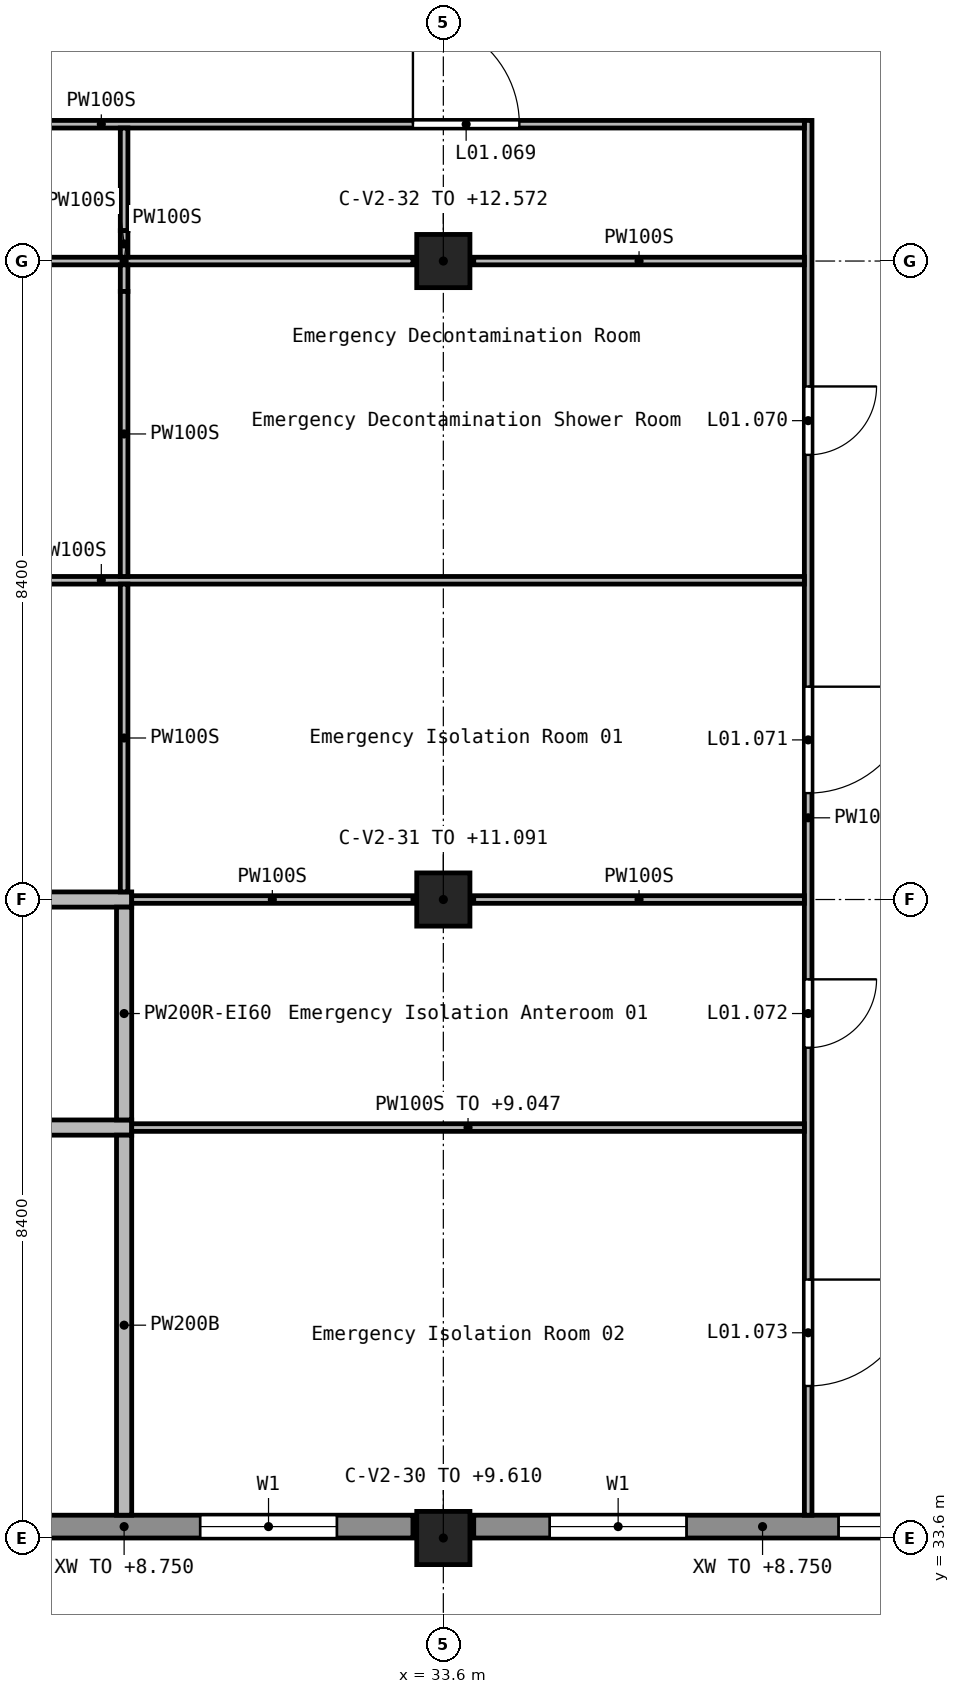
"""IFC4 building model, lengths in metres.
Left out: names, types, materials, properties, quantities, classifications, styles, units other than length and angle.
Written with IfcOpenShell. Run it as: python <this file> out.ifc"""

import sys

from ifc_helpers import new_model, si_unit, direction, frame, frame_2d, origin, origin_2d, place, context, subcontext, project, spatial, rectangle, extrude, element, fill, save


model = new_model("IFC4")
c1 = context("Model", 3, precision=1e-05, world=origin(), true_north=direction((0.0, 1.0)))
c2 = subcontext(c1, "Body", "Model", "MODEL_VIEW")
j1 = project(units=[si_unit("LENGTHUNIT", "METRE"), si_unit("PLANEANGLEUNIT", "RADIAN")], contexts=[c1])
p1 = place(None, origin())
s1 = spatial("IfcSite", under=j1, at=p1, CompositionType="ELEMENT")
p2 = place(p1, origin())
s2 = spatial("IfcBuilding", under=s1, at=p2, CompositionType="ELEMENT")
p3 = place(p2, frame((0.0, 0.0, 5.4)))
s3 = spatial("IfcBuildingStorey", under=s2, at=p3, CompositionType="ELEMENT", Elevation=5.4)
p4 = place(p3, frame((33.6, 33.6, 0.0), z_axis=(0.0, 0.0, 1.0), x_axis=(1.0, 0.0, 0.0)))
e1 = element("IfcColumn", 1, at=p4, inside=s3, PredefinedType="COLUMN", context=c2, shape_type="SweptSolid", body=[
    extrude(rectangle(XDim=0.7, YDim=0.7, at=origin_2d()), origin(), (0.0, 0.0, 1.0), 4.21),
])
p5 = place(p3, frame((33.6, 42.0, 0.0), z_axis=(0.0, 0.0, 1.0), x_axis=(1.0, 0.0, 0.0)))
e2 = element("IfcColumn", 2, at=p5, inside=s3, PredefinedType="COLUMN", context=c2, shape_type="SweptSolid", body=[
    extrude(rectangle(XDim=0.7, YDim=0.7, at=origin_2d()), origin(), (0.0, 0.0, 1.0), 5.691),
])
p6 = place(p3, frame((33.6, 50.4, 0.0), z_axis=(0.0, 0.0, 1.0), x_axis=(1.0, 0.0, 0.0)))
e3 = element("IfcColumn", 3, at=p6, inside=s3, PredefinedType="COLUMN", context=c2, shape_type="SweptSolid", body=[
    extrude(rectangle(XDim=0.7, YDim=0.7, at=origin_2d()), origin(), (0.0, 0.0, 1.0), 7.172),
])
p7 = place(p3, frame((25.6, 33.75, 0.0), z_axis=(0.0, 0.0, 1.0), x_axis=(1.0, 0.0, 0.0)))
e4 = element("IfcWall", 4, at=p7, inside=s3, PredefinedType="STANDARD", context=c2, shape_type="SweptSolid", body=[
    extrude(rectangle(XDim=7.6, YDim=0.3, at=frame_2d((3.8, 0.0))), origin(), (0.0, 0.0, 1.0), 3.35),
])
p8 = place(p7, frame((1.0, 0.0, 0.9)))
e5 = element("IfcOpeningElement", 5, at=p8, cuts=e4, PredefinedType="OPENING", context=c2, shape_type="SweptSolid", body=[
    extrude(rectangle(XDim=1.8, YDim=1.5, at=frame_2d((0.9, 0.75))), frame((0.0, 0.16, 0.0), z_axis=(0.0, -1.0, 0.0), x_axis=(1.0, 0.0, 0.0)), (0.0, 0.0, 1.0), 0.32),
])
p9 = place(p7, frame((4.8, 0.0, 0.9)))
e6 = element("IfcOpeningElement", 6, at=p9, cuts=e4, PredefinedType="OPENING", context=c2, shape_type="SweptSolid", body=[
    extrude(rectangle(XDim=1.8, YDim=1.5, at=frame_2d((0.9, 0.75))), frame((0.0, 0.16, 0.0), z_axis=(0.0, -1.0, 0.0), x_axis=(1.0, 0.0, 0.0)), (0.0, 0.0, 1.0), 0.32),
])
p10 = place(p3, frame((34.0, 33.75, 0.0), z_axis=(0.0, 0.0, 1.0), x_axis=(1.0, 0.0, 0.0)))
e7 = element("IfcWall", 7, at=p10, inside=s3, PredefinedType="STANDARD", context=c2, shape_type="SweptSolid", body=[
    extrude(rectangle(XDim=7.6, YDim=0.3, at=frame_2d((3.8, 0.0))), origin(), (0.0, 0.0, 1.0), 3.35),
])
p11 = place(p10, frame((1.0, 0.0, 0.9)))
e8 = element("IfcOpeningElement", 8, at=p11, cuts=e7, PredefinedType="OPENING", context=c2, shape_type="SweptSolid", body=[
    extrude(rectangle(XDim=1.8, YDim=1.5, at=frame_2d((0.9, 0.75))), frame((0.0, 0.16, 0.0), z_axis=(0.0, -1.0, 0.0), x_axis=(1.0, 0.0, 0.0)), (0.0, 0.0, 1.0), 0.32),
])
p12 = place(p10, frame((4.8, 0.0, 0.9)))
e9 = element("IfcOpeningElement", 9, at=p12, cuts=e7, PredefinedType="OPENING", context=c2, shape_type="SweptSolid", body=[
    extrude(rectangle(XDim=1.8, YDim=1.5, at=frame_2d((0.9, 0.75))), frame((0.0, 0.16, 0.0), z_axis=(0.0, -1.0, 0.0), x_axis=(1.0, 0.0, 0.0)), (0.0, 0.0, 1.0), 0.32),
])
p13 = place(p3, frame((19.7, 39.0, 0.0), z_axis=(0.0, 0.0, 1.0), x_axis=(1.0, 0.0, 0.0)))
e10 = element("IfcWall", 10, at=p13, inside=s3, PredefinedType="SOLIDWALL", context=c2, shape_type="SweptSolid", body=[
    extrude(rectangle(XDim=9.8, YDim=0.2, at=frame_2d((4.9, 0.0))), origin(), (0.0, 0.0, 1.0), 3.647),
])
p14 = place(p3, frame((25.6, 42.0, 0.0), z_axis=(0.0, 0.0, 1.0), x_axis=(1.0, 0.0, 0.0)))
e11 = element("IfcWall", 11, at=p14, inside=s3, PredefinedType="SOLIDWALL", context=c2, shape_type="SweptSolid", body=[
    extrude(rectangle(XDim=3.9, YDim=0.2, at=frame_2d((1.95, 0.0))), origin(), (0.0, 0.0, 1.0), 4.15),
])
p15 = place(p3, frame((29.4, 39.1, 0.0), z_axis=(0.0, 0.0, 1.0), x_axis=(0.0, 1.0, 0.0)))
e12 = element("IfcWall", 12, at=p15, inside=s3, PredefinedType="SOLIDWALL", context=c2, shape_type="SweptSolid", body=[
    extrude(rectangle(XDim=2.8, YDim=0.2, at=frame_2d((1.4, 0.0))), origin(), (0.0, 0.0, 1.0), 4.15),
])
p16 = place(p3, frame((29.4, 33.9, 0.0), z_axis=(0.0, 0.0, 1.0), x_axis=(0.0, 1.0, 0.0)))
e13 = element("IfcWall", 13, at=p16, inside=s3, PredefinedType="SOLIDWALL", context=c2, shape_type="SweptSolid", body=[
    extrude(rectangle(XDim=5.0, YDim=0.2, at=frame_2d((2.5, 0.0))), origin(), (0.0, 0.0, 1.0), 4.15),
])
p17 = place(p3, frame((38.4, 52.25, 0.0), z_axis=(0.0, 0.0, 1.0), x_axis=(0.0, -1.0, 0.0)))
e14 = element("IfcWall", 14, at=p17, inside=s3, PredefinedType="PARTITIONING", context=c2, shape_type="SweptSolid", body=[
    extrude(rectangle(XDim=18.35, YDim=0.1, at=frame_2d((9.175, 0.0))), origin(), (0.0, 0.0, 1.0), 4.15),
])
p18 = place(p17, frame((3.5, 0.0, 0.0)))
e15 = element("IfcOpeningElement", 15, at=p18, cuts=e14, PredefinedType="OPENING", context=c2, shape_type="SweptSolid", body=[
    extrude(rectangle(XDim=0.9, YDim=2.1, at=frame_2d((0.45, 1.05))), frame((0.0, 0.06, 0.0), z_axis=(0.0, -1.0, 0.0), x_axis=(1.0, 0.0, 0.0)), (0.0, 0.0, 1.0), 0.12),
])
p19 = place(p17, frame((7.45, 0.0, 0.0)))
e16 = element("IfcOpeningElement", 16, at=p19, cuts=e14, PredefinedType="OPENING", context=c2, shape_type="SweptSolid", body=[
    extrude(rectangle(XDim=1.4, YDim=2.1, at=frame_2d((0.7, 1.05))), frame((0.0, 0.06, 0.0), z_axis=(0.0, -1.0, 0.0), x_axis=(1.0, 0.0, 0.0)), (0.0, 0.0, 1.0), 0.12),
])
p20 = place(p17, frame((11.3, 0.0, 0.0)))
e17 = element("IfcOpeningElement", 17, at=p20, cuts=e14, PredefinedType="OPENING", context=c2, shape_type="SweptSolid", body=[
    extrude(rectangle(XDim=0.9, YDim=2.1, at=frame_2d((0.45, 1.05))), frame((0.0, 0.06, 0.0), z_axis=(0.0, -1.0, 0.0), x_axis=(1.0, 0.0, 0.0)), (0.0, 0.0, 1.0), 0.12),
])
p21 = place(p17, frame((15.25, 0.0, 0.0)))
e18 = element("IfcOpeningElement", 18, at=p21, cuts=e14, PredefinedType="OPENING", context=c2, shape_type="SweptSolid", body=[
    extrude(rectangle(XDim=1.4, YDim=2.1, at=frame_2d((0.7, 1.05))), frame((0.0, 0.06, 0.0), z_axis=(0.0, -1.0, 0.0), x_axis=(1.0, 0.0, 0.0)), (0.0, 0.0, 1.0), 0.12),
])
p22 = place(p3, frame((19.85, 46.2, 0.0), z_axis=(0.0, 0.0, 1.0), x_axis=(1.0, 0.0, 0.0)))
e19 = element("IfcWall", 19, at=p22, inside=s3, PredefinedType="PARTITIONING", context=c2, shape_type="SweptSolid", body=[
    extrude(rectangle(XDim=18.5, YDim=0.1, at=frame_2d((9.25, 0.0))), origin(), (0.0, 0.0, 1.0), 4.15),
])
p23 = place(p3, frame((25.6, 50.4, 0.0), z_axis=(0.0, 0.0, 1.0), x_axis=(1.0, 0.0, 0.0)))
e20 = element("IfcWall", 20, at=p23, inside=s3, PredefinedType="PARTITIONING", context=c2, shape_type="SweptSolid", body=[
    extrude(rectangle(XDim=7.6, YDim=0.1, at=frame_2d((3.8, 0.0))), origin(), (0.0, 0.0, 1.0), 4.15),
])
p24 = place(p3, frame((34.0, 50.4, 0.0), z_axis=(0.0, 0.0, 1.0), x_axis=(1.0, 0.0, 0.0)))
e21 = element("IfcWall", 21, at=p24, inside=s3, PredefinedType="PARTITIONING", context=c2, shape_type="SweptSolid", body=[
    extrude(rectangle(XDim=4.35, YDim=0.1, at=frame_2d((2.175, 0.0))), origin(), (0.0, 0.0, 1.0), 4.15),
])
p25 = place(p3, frame((19.85, 52.2, 0.0), z_axis=(0.0, 0.0, 1.0), x_axis=(1.0, 0.0, 0.0)))
e22 = element("IfcWall", 22, at=p25, inside=s3, PredefinedType="PARTITIONING", context=c2, shape_type="SweptSolid", body=[
    extrude(rectangle(XDim=18.5, YDim=0.1, at=frame_2d((9.25, 0.0))), origin(), (0.0, 0.0, 1.0), 4.15),
])
p26 = place(p25, frame((4.3, 0.0, 0.0)))
e23 = element("IfcOpeningElement", 23, at=p26, cuts=e22, PredefinedType="OPENING", context=c2, shape_type="SweptSolid", body=[
    extrude(rectangle(XDim=0.9, YDim=2.1, at=frame_2d((0.45, 1.05))), frame((0.0, 0.06, 0.0), z_axis=(0.0, -1.0, 0.0), x_axis=(1.0, 0.0, 0.0)), (0.0, 0.0, 1.0), 0.12),
])
p27 = place(p25, frame((13.35, 0.0, 0.0)))
e24 = element("IfcOpeningElement", 24, at=p27, cuts=e22, PredefinedType="OPENING", context=c2, shape_type="SweptSolid", body=[
    extrude(rectangle(XDim=1.4, YDim=2.1, at=frame_2d((0.7, 1.05))), frame((0.0, 0.06, 0.0), z_axis=(0.0, -1.0, 0.0), x_axis=(1.0, 0.0, 0.0)), (0.0, 0.0, 1.0), 0.12),
])
p28 = place(p3, frame((29.4, 52.15, 0.0), z_axis=(0.0, 0.0, 1.0), x_axis=(0.0, -1.0, 0.0)))
e25 = element("IfcWall", 25, at=p28, inside=s3, PredefinedType="PARTITIONING", context=c2, shape_type="SweptSolid", body=[
    extrude(rectangle(XDim=1.35, YDim=0.1, at=frame_2d((0.675, 0.0))), origin(), (0.0, 0.0, 1.0), 4.15),
])
for number, where, z_axis, x_axis in (
    (26, (29.4, 50.8, 0.0), (0.0, 0.0, 1.0), (0.0, -1.0, 0.0)),
    (27, (29.4, 50.35, 0.0), (0.0, 0.0, 1.0), (0.0, -1.0, 0.0)),
):
    element("IfcWall", number, at=place(p3, frame(where, z_axis=z_axis, x_axis=x_axis)), inside=s3, PredefinedType="PARTITIONING", context=c2, shape_type="SweptSolid", body=[
        extrude(rectangle(XDim=0.35, YDim=0.1, at=frame_2d((0.175, 0.0))), origin(), (0.0, 0.0, 1.0), 4.15),
    ])
p29 = place(p3, frame((29.4, 50.0, 0.0), z_axis=(0.0, 0.0, 1.0), x_axis=(0.0, -1.0, 0.0)))
e28 = element("IfcWall", 28, at=p29, inside=s3, PredefinedType="PARTITIONING", context=c2, shape_type="SweptSolid", body=[
    extrude(rectangle(XDim=3.75, YDim=0.1, at=frame_2d((1.875, 0.0))), origin(), (0.0, 0.0, 1.0), 4.15),
])
p30 = place(p3, frame((29.4, 46.15, 0.0), z_axis=(0.0, 0.0, 1.0), x_axis=(0.0, -1.0, 0.0)))
e29 = element("IfcWall", 29, at=p30, inside=s3, PredefinedType="PARTITIONING", context=c2, shape_type="SweptSolid", body=[
    extrude(rectangle(XDim=4.05, YDim=0.1, at=frame_2d((2.025, 0.0))), origin(), (0.0, 0.0, 1.0), 4.15),
])
p31 = place(p3, frame((29.5, 39.0, 0.0), z_axis=(0.0, 0.0, 1.0), x_axis=(1.0, 0.0, 0.0)))
e30 = element("IfcWall", 30, at=p31, inside=s3, PredefinedType="PARTITIONING", context=c2, shape_type="SweptSolid", body=[
    extrude(rectangle(XDim=8.85, YDim=0.1, at=frame_2d((4.425, 0.0))), origin(), (0.0, 0.0, 1.0), 3.647),
])
p32 = place(p3, frame((29.5, 42.0, 0.0), z_axis=(0.0, 0.0, 1.0), x_axis=(1.0, 0.0, 0.0)))
e31 = element("IfcWall", 31, at=p32, inside=s3, PredefinedType="PARTITIONING", context=c2, shape_type="SweptSolid", body=[
    extrude(rectangle(XDim=3.7, YDim=0.1, at=frame_2d((1.85, 0.0))), origin(), (0.0, 0.0, 1.0), 4.15),
])
p33 = place(p3, frame((34.0, 42.0, 0.0), z_axis=(0.0, 0.0, 1.0), x_axis=(1.0, 0.0, 0.0)))
e32 = element("IfcWall", 32, at=p33, inside=s3, PredefinedType="PARTITIONING", context=c2, shape_type="SweptSolid", body=[
    extrude(rectangle(XDim=4.35, YDim=0.1, at=frame_2d((2.175, 0.0))), origin(), (0.0, 0.0, 1.0), 4.15),
])
p34 = place(p9, origin())
e33 = element("IfcWindow", 33, at=p34, inside=s3, PartitioningType="SINGLE_PANEL", PredefinedType="WINDOW", context=c2, shape_type="SweptSolid", body=[
    extrude(rectangle(XDim=1.8, YDim=1.5, at=frame_2d((0.9, 0.75))), frame((0.0, 0.03, 0.0), z_axis=(0.0, -1.0, 0.0), x_axis=(1.0, 0.0, 0.0)), (0.0, 0.0, 1.0), 0.06),
])
fill(e6, e33)
p35 = place(p11, origin())
e34 = element("IfcWindow", 34, at=p35, inside=s3, PartitioningType="SINGLE_PANEL", PredefinedType="WINDOW", context=c2, shape_type="SweptSolid", body=[
    extrude(rectangle(XDim=1.8, YDim=1.5, at=frame_2d((0.9, 0.75))), frame((0.0, 0.03, 0.0), z_axis=(0.0, -1.0, 0.0), x_axis=(1.0, 0.0, 0.0)), (0.0, 0.0, 1.0), 0.06),
])
fill(e8, e34)
p36 = place(p12, origin())
e35 = element("IfcWindow", 35, at=p36, inside=s3, PartitioningType="SINGLE_PANEL", PredefinedType="WINDOW", context=c2, shape_type="SweptSolid", body=[
    extrude(rectangle(XDim=1.8, YDim=1.5, at=frame_2d((0.9, 0.75))), frame((0.0, 0.03, 0.0), z_axis=(0.0, -1.0, 0.0), x_axis=(1.0, 0.0, 0.0)), (0.0, 0.0, 1.0), 0.06),
])
fill(e9, e35)
p37 = place(p27, frame((1.4, 0.0, 0.0), z_axis=(0.0, 0.0, 1.0), x_axis=(-1.0, 0.0, 0.0)))
e36 = element("IfcDoor", 36, at=p37, inside=s3, OperationType="DOUBLE_DOOR_SINGLE_SWING", PredefinedType="DOOR", context=c2, shape_type="SweptSolid", body=[
    extrude(rectangle(XDim=1.4, YDim=2.1, at=frame_2d((0.7, 1.05))), frame((0.0, 0.025, 0.0), z_axis=(0.0, -1.0, 0.0), x_axis=(1.0, 0.0, 0.0)), (0.0, 0.0, 1.0), 0.05),
])
fill(e24, e36)
p38 = place(p18, frame((0.9, 0.0, 0.0), z_axis=(0.0, 0.0, 1.0), x_axis=(-1.0, 0.0, 0.0)))
e37 = element("IfcDoor", 37, at=p38, inside=s3, OperationType="SINGLE_SWING_RIGHT", PredefinedType="DOOR", context=c2, shape_type="SweptSolid", body=[
    extrude(rectangle(XDim=0.9, YDim=2.1, at=frame_2d((0.45, 1.05))), frame((0.0, 0.025, 0.0), z_axis=(0.0, -1.0, 0.0), x_axis=(1.0, 0.0, 0.0)), (0.0, 0.0, 1.0), 0.05),
])
fill(e15, e37)
p39 = place(p19, frame((1.4, 0.0, 0.0), z_axis=(0.0, 0.0, 1.0), x_axis=(-1.0, 0.0, 0.0)))
e38 = element("IfcDoor", 38, at=p39, inside=s3, OperationType="DOUBLE_DOOR_SINGLE_SWING", PredefinedType="DOOR", context=c2, shape_type="SweptSolid", body=[
    extrude(rectangle(XDim=1.4, YDim=2.1, at=frame_2d((0.7, 1.05))), frame((0.0, 0.025, 0.0), z_axis=(0.0, -1.0, 0.0), x_axis=(1.0, 0.0, 0.0)), (0.0, 0.0, 1.0), 0.05),
])
fill(e16, e38)
p40 = place(p20, frame((0.9, 0.0, 0.0), z_axis=(0.0, 0.0, 1.0), x_axis=(-1.0, 0.0, 0.0)))
e39 = element("IfcDoor", 39, at=p40, inside=s3, OperationType="SINGLE_SWING_LEFT", PredefinedType="DOOR", context=c2, shape_type="SweptSolid", body=[
    extrude(rectangle(XDim=0.9, YDim=2.1, at=frame_2d((0.45, 1.05))), frame((0.0, 0.025, 0.0), z_axis=(0.0, -1.0, 0.0), x_axis=(1.0, 0.0, 0.0)), (0.0, 0.0, 1.0), 0.05),
])
fill(e17, e39)
p41 = place(p21, frame((1.4, 0.0, 0.0), z_axis=(0.0, 0.0, 1.0), x_axis=(-1.0, 0.0, 0.0)))
e40 = element("IfcDoor", 40, at=p41, inside=s3, OperationType="DOUBLE_DOOR_SINGLE_SWING", PredefinedType="DOOR", context=c2, shape_type="SweptSolid", body=[
    extrude(rectangle(XDim=1.4, YDim=2.1, at=frame_2d((0.7, 1.05))), frame((0.0, 0.025, 0.0), z_axis=(0.0, -1.0, 0.0), x_axis=(1.0, 0.0, 0.0)), (0.0, 0.0, 1.0), 0.05),
])
fill(e18, e40)
save(model, sys.argv[1])
